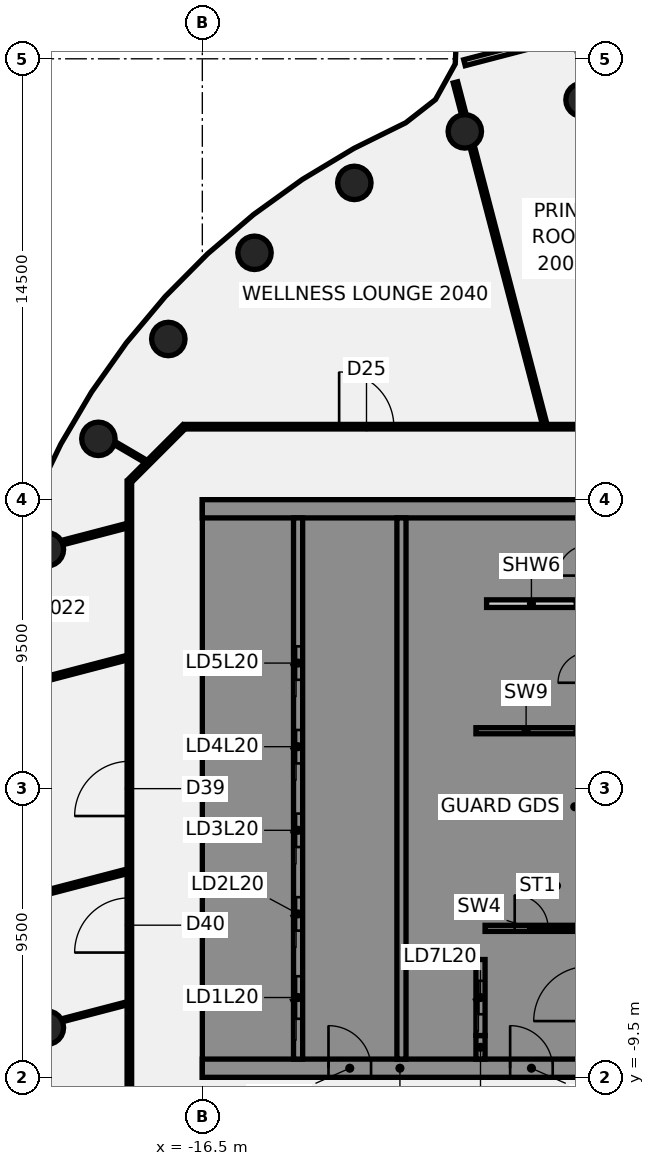
"""IFC4 building model, lengths in metres.
Left out: names, types, materials, properties, quantities, classifications, styles, units other than length and angle.
Written with IfcOpenShell. Run it as: python <this file> out.ifc"""

import sys

from ifc_helpers import new_model, si_unit, direction, frame, frame_2d, origin, origin_2d, place, context, subcontext, project, spatial, polyline, rectangle, circle, outline, extrude, element, fill, save


model = new_model("IFC4")
c1 = context("Model", 3, precision=1e-05, world=origin(), true_north=direction((0.0, 1.0)))
c2 = subcontext(c1, "Body", "Model", "MODEL_VIEW")
j1 = project(units=[si_unit("LENGTHUNIT", "METRE"), si_unit("PLANEANGLEUNIT", "RADIAN")], contexts=[c1])
p1 = place(None, origin())
s1 = spatial("IfcSite", under=j1, at=p1, CompositionType="ELEMENT")
p2 = place(p1, origin())
s2 = spatial("IfcBuilding", under=s1, at=p2, CompositionType="ELEMENT")
p3 = place(p2, frame((0.0, 0.0, 87.25)))
s3 = spatial("IfcBuildingStorey", under=s2, at=p3, CompositionType="ELEMENT", Elevation=87.25)
for number, where, z_axis, x_axis in (
    (1, (-3.994, 22.651, -0.14), (0.0, 0.0, 1.0), (1.0, 0.0, 0.0)),
    (2, (-7.866, 21.613, -0.14), (0.0, 0.0, 1.0), (1.0, 0.0, 0.0)),
    (3, (-11.5, 19.919, -0.14), (0.0, 0.0, 1.0), (1.0, 0.0, 0.0)),
    (4, (-14.784, 17.619, -0.14), (0.0, 0.0, 1.0), (1.0, 0.0, 0.0)),
    (5, (-17.619, 14.784, -0.14), (0.0, 0.0, 1.0), (1.0, 0.0, 0.0)),
    (6, (-19.919, 11.5, -0.14), (0.0, 0.0, 1.0), (1.0, 0.0, 0.0)),
    (7, (-21.613, 7.866, -0.14), (0.0, 0.0, 1.0), (1.0, 0.0, 0.0)),
    (8, (-21.613, -7.866, -0.14), (0.0, 0.0, 1.0), (1.0, 0.0, 0.0)),
):
    element("IfcColumn", number, at=place(p3, frame(where, z_axis=z_axis, x_axis=x_axis)), inside=s3, PredefinedType="COLUMN", context=c2, shape_type="SweptSolid", body=[
        extrude(circle(Radius=0.55, at=origin_2d()), origin(), (0.0, 0.0, 1.0), 3.75),
    ])
p4 = place(p3, frame((-8.174, 23.224, 0.0), z_axis=(0.0, 0.0, 1.0), x_axis=(0.25264882797, -0.967558044628, 0.0)))
e9 = element("IfcWall", 9, at=p4, inside=s3, PredefinedType="PARTITIONING", context=c2, shape_type="SweptSolid", body=[
    extrude(rectangle(XDim=1.095, YDim=0.15, at=frame_2d((0.547, 0.0))), origin(), (0.0, 0.0, 1.0), 3.01),
])
p5 = place(p3, frame((-7.624, 21.118, 0.0), z_axis=(0.0, 0.0, 1.0), x_axis=(0.252471343735, -0.967604371937, 0.0)))
e10 = element("IfcWall", 10, at=p5, inside=s3, PredefinedType="PARTITIONING", context=c2, shape_type="SweptSolid", body=[
    extrude(rectangle(XDim=9.447, YDim=0.15, at=frame_2d((4.723, 0.0))), origin(), (0.0, 0.0, 1.0), 3.01),
])
p6 = place(p3, frame((-4.224, 24.721, 0.0), z_axis=(0.0, 0.0, 1.0), x_axis=(0.252582358836, -0.967575398615, 0.0)))
e11 = element("IfcWall", 11, at=p6, inside=s3, PredefinedType="PARTITIONING", context=c2, shape_type="SweptSolid", body=[
    extrude(rectangle(XDim=1.61, YDim=0.15, at=frame_2d((0.805, 0.0))), origin(), (0.0, 0.0, 1.0), 3.01),
])
p7 = place(p3, frame((-19.394, 11.367, 0.0), z_axis=(0.0, 0.0, 1.0), x_axis=(0.862752975696, -0.505625654935, 0.0)))
e12 = element("IfcWall", 12, at=p7, inside=s3, PredefinedType="PARTITIONING", context=c2, shape_type="SweptSolid", body=[
    extrude(rectangle(XDim=1.202, YDim=0.1, at=frame_2d((0.601, 0.0))), origin(), (0.0, 0.0, 1.0), 3.01),
])
p8 = place(p3, frame((-17.065, 11.9, 0.0), z_axis=(0.0, 0.0, 1.0), x_axis=(1.0, 0.0, 0.0)))
e13 = element("IfcWall", 13, at=p8, inside=s3, PredefinedType="PARTITIONING", context=c2, shape_type="SweptSolid", body=[
    extrude(rectangle(XDim=34.165, YDim=0.15, at=frame_2d((17.083, 0.0))), origin(), (0.0, 0.0, 1.0), 3.01),
])
p9 = place(p8, frame((18.737, 0.0, 0.0)))
e14 = element("IfcOpeningElement", 14, at=p9, cuts=e13, PredefinedType="OPENING", context=c2, shape_type="SweptSolid", body=[
    extrude(rectangle(XDim=1.8, YDim=2.1, at=frame_2d((0.9, 1.05))), frame((0.0, 0.085, 0.0), z_axis=(0.0, -1.0, 0.0), x_axis=(1.0, 0.0, 0.0)), (0.0, 0.0, 1.0), 0.17),
])
p10 = place(p8, frame((30.556, 0.0, 0.0)))
e15 = element("IfcOpeningElement", 15, at=p10, cuts=e13, PredefinedType="OPENING", context=c2, shape_type="SweptSolid", body=[
    extrude(rectangle(XDim=1.8, YDim=2.1, at=frame_2d((0.9, 1.05))), frame((0.0, 0.085, 0.0), z_axis=(0.0, -1.0, 0.0), x_axis=(1.0, 0.0, 0.0)), (0.0, 0.0, 1.0), 0.17),
])
p11 = place(p8, frame((5.065, 0.0, 0.0)))
e16 = element("IfcOpeningElement", 16, at=p11, cuts=e13, PredefinedType="OPENING", context=c2, shape_type="SweptSolid", body=[
    extrude(rectangle(XDim=1.8, YDim=2.1, at=frame_2d((0.9, 1.05))), frame((0.0, 0.085, 0.0), z_axis=(0.0, -1.0, 0.0), x_axis=(1.0, 0.0, 0.0)), (0.0, 0.0, 1.0), 0.17),
])
p12 = place(p3, frame((-26.438, 2.355, 0.0), z_axis=(0.0, 0.0, 1.0), x_axis=(0.967579940303, 0.252564960203, 0.0)))
e17 = element("IfcWall", 17, at=p12, inside=s3, PredefinedType="PARTITIONING", context=c2, shape_type="SweptSolid", body=[
    extrude(rectangle(XDim=7.711, YDim=0.15, at=frame_2d((3.855, 0.0))), origin(), (0.0, 0.0, 1.0), 3.01),
])
p13 = place(p12, frame((2.45, 0.0, 0.0)))
e18 = element("IfcOpeningElement", 18, at=p13, cuts=e17, PredefinedType="OPENING", context=c2, shape_type="SweptSolid", body=[
    extrude(rectangle(XDim=0.9, YDim=2.1, at=frame_2d((0.45, 1.05))), frame((0.0, 0.085, 0.0), z_axis=(0.0, -1.0, 0.0), x_axis=(1.0, 0.0, 0.0)), (0.0, 0.0, 1.0), 0.17),
])
p14 = place(p3, frame((-22.29, -3.59, 0.0), z_axis=(0.0, 0.0, 1.0), x_axis=(0.967595308008, 0.252506078978, 0.0)))
e19 = element("IfcWall", 19, at=p14, inside=s3, PredefinedType="PARTITIONING", context=c2, shape_type="SweptSolid", body=[
    extrude(rectangle(XDim=3.424, YDim=0.15, at=frame_2d((1.712, 0.0))), origin(), (0.0, 0.0, 1.0), 3.01),
])
p15 = place(p3, frame((-21.118, -7.625, 0.0), z_axis=(0.0, 0.0, 1.0), x_axis=(0.967630105584, 0.252372698141, 0.0)))
e20 = element("IfcWall", 20, at=p15, inside=s3, PredefinedType="PARTITIONING", context=c2, shape_type="SweptSolid", body=[
    extrude(rectangle(XDim=2.222, YDim=0.1, at=frame_2d((1.111, 0.0))), origin(), (0.0, 0.0, 1.0), 3.01),
])
p16 = place(p3, frame((-21.112, 8.087, 0.0), z_axis=(0.0, 0.0, 1.0), x_axis=(0.967584357106, 0.252548038764, 0.0)))
e21 = element("IfcWall", 21, at=p16, inside=s3, PredefinedType="PARTITIONING", context=c2, shape_type="SweptSolid", body=[
    extrude(rectangle(XDim=2.206, YDim=0.15, at=frame_2d((1.103, 0.0))), origin(), (0.0, 0.0, 1.0), 3.01),
])
p17 = place(p3, frame((-7.878, 23.871, 0.0), z_axis=(0.0, 0.0, 1.0), x_axis=(0.967613528242, 0.252436249306, 0.0)))
e22 = element("IfcWall", 22, at=p17, inside=s3, PredefinedType="PARTITIONING", context=c2, shape_type="SweptSolid", body=[
    extrude(rectangle(XDim=13.849, YDim=0.2, at=frame_2d((6.925, 0.0))), origin(), (0.0, 0.0, 1.0), 3.01),
])
p18 = place(p17, frame((6.55, 0.0, 0.0)))
e23 = element("IfcOpeningElement", 23, at=p18, cuts=e22, PredefinedType="OPENING", context=c2, shape_type="SweptSolid", body=[
    extrude(rectangle(XDim=1.4, YDim=2.1, at=frame_2d((0.7, 1.05))), frame((0.0, 0.11, 0.0), z_axis=(0.0, -1.0, 0.0), x_axis=(1.0, 0.0, 0.0)), (0.0, 0.0, 1.0), 0.22),
])
p19 = place(p17, frame((8.8, 0.0, 0.0)))
e24 = element("IfcOpeningElement", 24, at=p19, cuts=e22, PredefinedType="OPENING", context=c2, shape_type="SweptSolid", body=[
    extrude(rectangle(XDim=0.9, YDim=2.1, at=frame_2d((0.45, 1.05))), frame((0.0, 0.11, 0.0), z_axis=(0.0, -1.0, 0.0), x_axis=(1.0, 0.0, 0.0)), (0.0, 0.0, 1.0), 0.22),
])
p20 = place(p3, frame((-18.872, 10.128, 0.0), z_axis=(0.0, 0.0, 1.0), x_axis=(0.707106781187, 0.707106781187, 0.0)))
e25 = element("IfcWall", 25, at=p20, inside=s3, PredefinedType="PARTITIONING", context=c2, shape_type="SweptSolid", body=[
    extrude(rectangle(XDim=2.505, YDim=0.15, at=frame_2d((1.253, 0.0))), origin(), (0.0, 0.0, 1.0), 3.01),
])
p21 = place(p3, frame((-18.9, -10.1, 0.0), z_axis=(0.0, 0.0, 1.0), x_axis=(0.0, 1.0, 0.0)))
e26 = element("IfcWall", 26, at=p21, inside=s3, PredefinedType="PARTITIONING", context=c2, shape_type="SweptSolid", body=[
    extrude(rectangle(XDim=20.2, YDim=0.15, at=frame_2d((10.1, 0.0))), origin(), (0.0, 0.0, 1.0), 3.01),
])
p22 = place(p21, frame((9.195, 0.0, 0.0)))
e27 = element("IfcOpeningElement", 27, at=p22, cuts=e26, PredefinedType="OPENING", context=c2, shape_type="SweptSolid", body=[
    extrude(rectangle(XDim=1.8, YDim=2.1, at=frame_2d((0.9, 1.05))), frame((0.0, 0.085, 0.0), z_axis=(0.0, -1.0, 0.0), x_axis=(1.0, 0.0, 0.0)), (0.0, 0.0, 1.0), 0.17),
])
p23 = place(p21, frame((4.704, 0.0, 0.0)))
e28 = element("IfcOpeningElement", 28, at=p23, cuts=e26, PredefinedType="OPENING", context=c2, shape_type="SweptSolid", body=[
    extrude(rectangle(XDim=1.8, YDim=2.1, at=frame_2d((0.9, 1.05))), frame((0.0, 0.085, 0.0), z_axis=(0.0, -1.0, 0.0), x_axis=(1.0, 0.0, 0.0)), (0.0, 0.0, 1.0), 0.17),
])
p24 = place(p3, frame((-16.5, -9.2, 0.0), z_axis=(0.0, 0.0, 1.0), x_axis=(1.0, 0.0, 0.0)))
e29 = element("IfcWall", 29, at=p24, inside=s3, PredefinedType="SHEAR", context=c2, shape_type="SweptSolid", body=[
    extrude(rectangle(XDim=13.0, YDim=0.6, at=frame_2d((6.5, 0.0))), origin(), (0.0, 0.0, 1.0), 3.61),
])
p25 = place(p24, frame((4.15, 0.0, 0.0)))
e30 = element("IfcOpeningElement", 30, at=p25, cuts=e29, PredefinedType="OPENING", context=c2, shape_type="SweptSolid", body=[
    extrude(rectangle(XDim=1.4, YDim=2.1, at=frame_2d((0.7, 1.05))), frame((0.0, 0.31, 0.0), z_axis=(0.0, -1.0, 0.0), x_axis=(1.0, 0.0, 0.0)), (0.0, 0.0, 1.0), 0.62),
])
p26 = place(p24, frame((10.125, 0.0, 0.0)))
e31 = element("IfcOpeningElement", 31, at=p26, cuts=e29, PredefinedType="OPENING", context=c2, shape_type="SweptSolid", body=[
    extrude(rectangle(XDim=1.4, YDim=2.1, at=frame_2d((0.7, 1.05))), frame((0.0, 0.31, 0.0), z_axis=(0.0, -1.0, 0.0), x_axis=(1.0, 0.0, 0.0)), (0.0, 0.0, 1.0), 0.62),
])
p27 = place(p3, origin())
e32 = element("IfcWall", 32, at=p27, inside=s3, PredefinedType="SHEAR", context=c2, shape_type="SweptSolid", body=[
    extrude(outline(polyline([(-13.5, -8.9), (-13.5, -8.125), (-15.9, -8.125), (-15.9, -5.625), (-13.5, -5.625), (-13.5, -5.375), (-15.9, -5.375), (-15.9, -2.875), (-13.5, -2.875), (-13.5, -2.625), (-15.9, -2.625), (-15.9, -0.125), (-13.5, -0.125), (-13.5, 0.125), (-15.9, 0.125), (-15.9, 2.625), (-13.5, 2.625), (-13.5, 2.875), (-15.9, 2.875), (-15.9, 5.375), (-13.5, 5.375), (-13.5, 5.625), (-15.9, 5.625), (-15.9, 8.125), (-13.5, 8.125), (-13.5, 8.9), (-15.9, 8.9), (-16.5, 8.9), (-16.5, -8.9), (-15.9, -8.9), (-13.5, -8.9)])), origin(), (0.0, 0.0, 1.0), 3.61),
])
p28 = place(p3, frame((-16.5, 9.2, 0.0), z_axis=(0.0, 0.0, 1.0), x_axis=(1.0, 0.0, 0.0)))
e33 = element("IfcWall", 33, at=p28, inside=s3, PredefinedType="SHEAR", context=c2, shape_type="SweptSolid", body=[
    extrude(rectangle(XDim=13.0, YDim=0.6, at=frame_2d((6.5, 0.0))), origin(), (0.0, 0.0, 1.0), 3.61),
])
p29 = place(p3, origin())
e34 = element("IfcWall", 34, at=p29, inside=s3, PredefinedType="SHEAR", context=c2, shape_type="SweptSolid", body=[
    extrude(outline(polyline([(-9.8, -5.375), (-9.8, -5.625), (-7.5, -5.625), (-7.2, -5.625), (-7.2, 8.9), (-7.5, 8.9), (-9.8, 8.9), (-9.8, 8.125), (-7.5, 8.125), (-7.5, 5.625), (-9.8, 5.625), (-9.8, 5.375), (-7.5, 5.375), (-7.5, 2.875), (-9.8, 2.875), (-9.8, 2.625), (-7.5, 2.625), (-7.5, 0.125), (-9.8, 0.125), (-9.8, -0.125), (-7.5, -0.125), (-7.5, -2.625), (-9.8, -2.625), (-9.8, -2.875), (-7.5, -2.875), (-7.5, -5.375), (-9.8, -5.375)])), origin(), (0.0, 0.0, 1.0), 3.61),
])
p30 = place(p3, origin())
e35 = element("IfcWall", 35, at=p30, inside=s3, PredefinedType="SHEAR", context=c2, shape_type="SweptSolid", body=[
    extrude(outline(polyline([(-7.5, -8.125), (-9.55, -8.125), (-9.55, -5.625), (-9.8, -5.625), (-9.8, -8.125), (-9.8, -8.9), (-7.5, -8.9), (-7.5, -8.125)])), origin(), (0.0, 0.0, 1.0), 3.61),
])
p31 = place(p3, frame((-7.35, -8.9, 0.0), z_axis=(0.0, 0.0, 1.0), x_axis=(0.0, 1.0, 0.0)))
e36 = element("IfcWall", 36, at=p31, inside=s3, PredefinedType="SHEAR", context=c2, shape_type="SweptSolid", body=[
    extrude(rectangle(XDim=0.775, YDim=0.3, at=frame_2d((0.387, 0.0))), origin(), (0.0, 0.0, 1.0), 3.61),
])
p32 = place(p3, frame((-7.5, 1.9, 0.0), z_axis=(0.0, 0.0, 1.0), x_axis=(1.0, 0.0, 0.0)))
e37 = element("IfcWall", 37, at=p32, inside=s3, PredefinedType="SHEAR", context=c2, shape_type="SweptSolid", body=[
    extrude(rectangle(XDim=3.3, YDim=0.2, at=frame_2d((1.65, 0.0))), origin(), (0.0, 0.0, 1.0), 3.61),
])
p33 = place(p3, frame((-13.35, -8.9, 0.0), z_axis=(0.0, 0.0, 1.0), x_axis=(0.0, 1.0, 0.0)))
e38 = element("IfcWall", 38, at=p33, inside=s3, PredefinedType="SHEAR", context=c2, shape_type="SweptSolid", body=[
    extrude(rectangle(XDim=17.8, YDim=0.3, at=frame_2d((8.9, 0.0))), origin(), (0.0, 0.0, 1.0), 3.61),
])
p34 = place(p33, frame((1.325, 0.0, 0.0)))
e39 = element("IfcOpeningElement", 39, at=p34, cuts=e38, PredefinedType="OPENING", context=c2, shape_type="SweptSolid", body=[
    extrude(rectangle(XDim=1.4, YDim=2.1, at=frame_2d((0.7, 1.05))), frame((0.0, 0.16, 0.0), z_axis=(0.0, -1.0, 0.0), x_axis=(1.0, 0.0, 0.0)), (0.0, 0.0, 1.0), 0.32),
])
p35 = place(p33, frame((4.225, 0.0, 0.0)))
e40 = element("IfcOpeningElement", 40, at=p35, cuts=e38, PredefinedType="OPENING", context=c2, shape_type="SweptSolid", body=[
    extrude(rectangle(XDim=1.1, YDim=2.1, at=frame_2d((0.55, 1.05))), frame((0.0, 0.16, 0.0), z_axis=(0.0, -1.0, 0.0), x_axis=(1.0, 0.0, 0.0)), (0.0, 0.0, 1.0), 0.32),
])
p36 = place(p33, frame((6.975, 0.0, 0.0)))
e41 = element("IfcOpeningElement", 41, at=p36, cuts=e38, PredefinedType="OPENING", context=c2, shape_type="SweptSolid", body=[
    extrude(rectangle(XDim=1.1, YDim=2.1, at=frame_2d((0.55, 1.05))), frame((0.0, 0.16, 0.0), z_axis=(0.0, -1.0, 0.0), x_axis=(1.0, 0.0, 0.0)), (0.0, 0.0, 1.0), 0.32),
])
p37 = place(p33, frame((9.725, 0.0, 0.0)))
e42 = element("IfcOpeningElement", 42, at=p37, cuts=e38, PredefinedType="OPENING", context=c2, shape_type="SweptSolid", body=[
    extrude(rectangle(XDim=1.1, YDim=2.1, at=frame_2d((0.55, 1.05))), frame((0.0, 0.16, 0.0), z_axis=(0.0, -1.0, 0.0), x_axis=(1.0, 0.0, 0.0)), (0.0, 0.0, 1.0), 0.32),
])
p38 = place(p33, frame((12.475, 0.0, 0.0)))
e43 = element("IfcOpeningElement", 43, at=p38, cuts=e38, PredefinedType="OPENING", context=c2, shape_type="SweptSolid", body=[
    extrude(rectangle(XDim=1.1, YDim=2.1, at=frame_2d((0.55, 1.05))), frame((0.0, 0.16, 0.0), z_axis=(0.0, -1.0, 0.0), x_axis=(1.0, 0.0, 0.0)), (0.0, 0.0, 1.0), 0.32),
])
p39 = place(p3, frame((-9.95, -8.9, 0.0), z_axis=(0.0, 0.0, 1.0), x_axis=(0.0, 1.0, 0.0)))
e44 = element("IfcWall", 44, at=p39, inside=s3, PredefinedType="SHEAR", context=c2, shape_type="SweptSolid", body=[
    extrude(rectangle(XDim=17.8, YDim=0.3, at=frame_2d((8.9, 0.0))), origin(), (0.0, 0.0, 1.0), 3.61),
])
p40 = place(p3, frame((-7.35, -8.125, 0.0), z_axis=(0.0, 0.0, 1.0), x_axis=(0.0, 1.0, 0.0)))
e45 = element("IfcWall", 45, at=p40, inside=s3, PredefinedType="SHEAR", context=c2, shape_type="SweptSolid", body=[
    extrude(rectangle(XDim=2.5, YDim=0.3, at=frame_2d((1.25, 0.0))), origin(), (0.0, 0.0, 1.0), 3.61),
])
p41 = place(p40, frame((0.7, 0.0, 0.0)))
e46 = element("IfcOpeningElement", 46, at=p41, cuts=e45, PredefinedType="OPENING", context=c2, shape_type="SweptSolid", body=[
    extrude(rectangle(XDim=1.1, YDim=2.1, at=frame_2d((0.55, 1.05))), frame((0.0, 0.16, 0.0), z_axis=(0.0, -1.0, 0.0), x_axis=(1.0, 0.0, 0.0)), (0.0, 0.0, 1.0), 0.32),
])
p42 = place(p3, frame((-7.15, 6.08, 0.0), z_axis=(0.0, 0.0, 1.0), x_axis=(1.0, 0.0, 0.0)))
e47 = element("IfcWall", 47, at=p42, inside=s3, PredefinedType="PARTITIONING", context=c2, shape_type="SweptSolid", body=[
    extrude(rectangle(XDim=2.95, YDim=0.25, at=frame_2d((1.475, 0.0))), origin(), (0.0, 0.0, 1.0), 3.61),
])
p43 = place(p3, frame((-7.2, -4.6, 0.0), z_axis=(0.0, 0.0, 1.0), x_axis=(1.0, 0.0, 0.0)))
e48 = element("IfcWall", 48, at=p43, inside=s3, PredefinedType="SHEAR", context=c2, shape_type="SweptSolid", body=[
    extrude(rectangle(XDim=3.1, YDim=0.2, at=frame_2d((1.55, 0.0))), origin(), (0.0, 0.0, 1.0), 3.61),
])
p44 = place(p43, frame((0.975, 0.0, 0.0)))
e49 = element("IfcOpeningElement", 49, at=p44, cuts=e48, PredefinedType="OPENING", context=c2, shape_type="SweptSolid", body=[
    extrude(rectangle(XDim=1.1, YDim=2.1, at=frame_2d((0.55, 1.05))), frame((0.0, 0.11, 0.0), z_axis=(0.0, -1.0, 0.0), x_axis=(1.0, 0.0, 0.0)), (0.0, 0.0, 1.0), 0.22),
])
p45 = place(p11, origin())
e50 = element("IfcDoor", 50, at=p45, inside=s3, OperationType="DOUBLE_DOOR_SINGLE_SWING", PredefinedType="DOOR", context=c2, shape_type="SweptSolid", body=[
    extrude(rectangle(XDim=1.8, YDim=2.1, at=frame_2d((0.9, 1.05))), frame((0.0, 0.025, 0.0), z_axis=(0.0, -1.0, 0.0), x_axis=(1.0, 0.0, 0.0)), (0.0, 0.0, 1.0), 0.05),
])
fill(e16, e50)
p46 = place(p22, frame((1.8, 0.0, 0.0), z_axis=(0.0, 0.0, 1.0), x_axis=(-1.0, 0.0, 0.0)))
e51 = element("IfcDoor", 51, at=p46, inside=s3, OperationType="DOUBLE_DOOR_SINGLE_SWING", PredefinedType="DOOR", context=c2, shape_type="SweptSolid", body=[
    extrude(rectangle(XDim=1.8, YDim=2.1, at=frame_2d((0.9, 1.05))), frame((0.0, 0.025, 0.0), z_axis=(0.0, -1.0, 0.0), x_axis=(1.0, 0.0, 0.0)), (0.0, 0.0, 1.0), 0.05),
])
fill(e27, e51)
p47 = place(p23, origin())
e52 = element("IfcDoor", 52, at=p47, inside=s3, OperationType="DOUBLE_DOOR_SINGLE_SWING", PredefinedType="DOOR", context=c2, shape_type="SweptSolid", body=[
    extrude(rectangle(XDim=1.8, YDim=2.1, at=frame_2d((0.9, 1.05))), frame((0.0, 0.025, 0.0), z_axis=(0.0, -1.0, 0.0), x_axis=(1.0, 0.0, 0.0)), (0.0, 0.0, 1.0), 0.05),
])
fill(e28, e52)
p48 = place(p25, origin())
e53 = element("IfcDoor", 53, at=p48, inside=s3, OperationType="SINGLE_SWING_LEFT", PredefinedType="DOOR", context=c2, shape_type="SweptSolid", body=[
    extrude(rectangle(XDim=1.4, YDim=2.1, at=frame_2d((0.7, 1.05))), frame((0.0, 0.025, 0.0), z_axis=(0.0, -1.0, 0.0), x_axis=(1.0, 0.0, 0.0)), (0.0, 0.0, 1.0), 0.05),
])
fill(e30, e53)
p49 = place(p26, origin())
e54 = element("IfcDoor", 54, at=p49, inside=s3, OperationType="SINGLE_SWING_LEFT", PredefinedType="DOOR", context=c2, shape_type="SweptSolid", body=[
    extrude(rectangle(XDim=1.4, YDim=2.1, at=frame_2d((0.7, 1.05))), frame((0.0, 0.025, 0.0), z_axis=(0.0, -1.0, 0.0), x_axis=(1.0, 0.0, 0.0)), (0.0, 0.0, 1.0), 0.05),
])
fill(e31, e54)
p50 = place(p44, origin())
e55 = element("IfcDoor", 55, at=p50, inside=s3, OperationType="SINGLE_SWING_LEFT", PredefinedType="DOOR", context=c2, shape_type="SweptSolid", body=[
    extrude(rectangle(XDim=1.1, YDim=2.1, at=frame_2d((0.55, 1.05))), frame((0.0, 0.025, 0.0), z_axis=(0.0, -1.0, 0.0), x_axis=(1.0, 0.0, 0.0)), (0.0, 0.0, 1.0), 0.05),
])
fill(e49, e55)
p51 = place(p34, origin())
e56 = element("IfcDoor", 56, at=p51, inside=s3, OperationType="SLIDING_TO_LEFT", PredefinedType="DOOR", context=c2, shape_type="SweptSolid", body=[
    extrude(rectangle(XDim=1.4, YDim=2.1, at=frame_2d((0.7, 1.05))), frame((0.0, 0.025, 0.0), z_axis=(0.0, -1.0, 0.0), x_axis=(1.0, 0.0, 0.0)), (0.0, 0.0, 1.0), 0.05),
])
fill(e39, e56)
p52 = place(p35, origin())
e57 = element("IfcDoor", 57, at=p52, inside=s3, OperationType="SLIDING_TO_LEFT", PredefinedType="DOOR", context=c2, shape_type="SweptSolid", body=[
    extrude(rectangle(XDim=1.1, YDim=2.1, at=frame_2d((0.55, 1.05))), frame((0.0, 0.025, 0.0), z_axis=(0.0, -1.0, 0.0), x_axis=(1.0, 0.0, 0.0)), (0.0, 0.0, 1.0), 0.05),
])
fill(e40, e57)
p53 = place(p36, origin())
e58 = element("IfcDoor", 58, at=p53, inside=s3, OperationType="SLIDING_TO_LEFT", PredefinedType="DOOR", context=c2, shape_type="SweptSolid", body=[
    extrude(rectangle(XDim=1.1, YDim=2.1, at=frame_2d((0.55, 1.05))), frame((0.0, 0.025, 0.0), z_axis=(0.0, -1.0, 0.0), x_axis=(1.0, 0.0, 0.0)), (0.0, 0.0, 1.0), 0.05),
])
fill(e41, e58)
p54 = place(p37, origin())
e59 = element("IfcDoor", 59, at=p54, inside=s3, OperationType="SLIDING_TO_LEFT", PredefinedType="DOOR", context=c2, shape_type="SweptSolid", body=[
    extrude(rectangle(XDim=1.1, YDim=2.1, at=frame_2d((0.55, 1.05))), frame((0.0, 0.025, 0.0), z_axis=(0.0, -1.0, 0.0), x_axis=(1.0, 0.0, 0.0)), (0.0, 0.0, 1.0), 0.05),
])
fill(e42, e59)
p55 = place(p38, origin())
e60 = element("IfcDoor", 60, at=p55, inside=s3, OperationType="SLIDING_TO_LEFT", PredefinedType="DOOR", context=c2, shape_type="SweptSolid", body=[
    extrude(rectangle(XDim=1.1, YDim=2.1, at=frame_2d((0.55, 1.05))), frame((0.0, 0.025, 0.0), z_axis=(0.0, -1.0, 0.0), x_axis=(1.0, 0.0, 0.0)), (0.0, 0.0, 1.0), 0.05),
])
fill(e43, e60)
p56 = place(p41, origin())
e61 = element("IfcDoor", 61, at=p56, inside=s3, OperationType="SLIDING_TO_LEFT", PredefinedType="DOOR", context=c2, shape_type="SweptSolid", body=[
    extrude(rectangle(XDim=1.1, YDim=2.1, at=frame_2d((0.55, 1.05))), frame((0.0, 0.025, 0.0), z_axis=(0.0, -1.0, 0.0), x_axis=(1.0, 0.0, 0.0)), (0.0, 0.0, 1.0), 0.05),
])
fill(e46, e61)
save(model, sys.argv[1])
